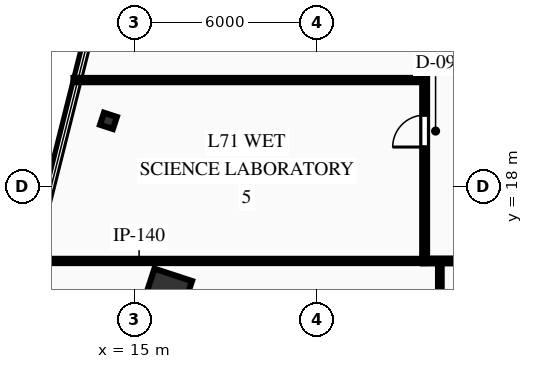
"""IFC4 building model, lengths in metres.
Left out: names, types, materials, properties, quantities, classifications, styles, units other than length and angle.
Written with IfcOpenShell. Run it as: python <this file> out.ifc"""

import sys

from ifc_helpers import new_model, si_unit, direction, frame, frame_2d, origin, origin_2d, place, context, subcontext, project, spatial, rectangle, hollow_rectangle, i_section, extrude, element, fill, save


model = new_model("IFC4")
c1 = context("Model", 3, precision=1e-05, world=origin(), true_north=direction((0.0, 1.0)))
c2 = subcontext(c1, "Body", "Model", "MODEL_VIEW")
j1 = project(units=[si_unit("LENGTHUNIT", "METRE"), si_unit("PLANEANGLEUNIT", "RADIAN")], contexts=[c1])
p1 = place(None, origin())
s1 = spatial("IfcSite", under=j1, at=p1, CompositionType="ELEMENT")
p2 = place(p1, origin())
s2 = spatial("IfcBuilding", under=s1, at=p2, CompositionType="ELEMENT")
p3 = place(p2, frame((0.0, 0.0, 282.45)))
s3 = spatial("IfcBuildingStorey", under=s2, at=p3, CompositionType="ELEMENT", Elevation=282.45)
p4 = place(p3, frame((16.077, 14.475, 0.0), z_axis=(0.0, 0.0, 1.0), x_axis=(0.311008203279, 0.950407227189, 0.0)))
e1 = element("IfcColumn", 1, at=p4, inside=s3, PredefinedType="COLUMN", context=c2, shape_type="SweptSolid", body=[
    extrude(hollow_rectangle(XDim=1.3, YDim=1.3, WallThickness=0.06, at=origin_2d()), origin(), (0.0, 0.0, 1.0), 3.75),
])
p5 = place(p3, frame((14.149, 20.158, 0.0), z_axis=(0.0, 0.0, 1.0), x_axis=(0.311008203279, 0.950407227189, 0.0)))
e2 = element("IfcColumn", 2, at=p5, inside=s3, PredefinedType="COLUMN", context=c2, shape_type="SweptSolid", body=[
    extrude(i_section(OverallWidth=0.416, OverallDepth=0.445, WebThickness=0.039, FlangeThickness=0.063, at=origin_2d()), origin(), (0.0, 0.0, 1.0), 3.75),
])
p6 = place(p3, frame((24.5, 15.55, 0.0), z_axis=(0.0, 0.0, 1.0), x_axis=(1.0, 0.0, 0.0)))
e3 = element("IfcWall", 3, at=p6, inside=s3, PredefinedType="PARTITIONING", context=c2, shape_type="SweptSolid", body=[
    extrude(rectangle(XDim=10.25, YDim=0.16, at=frame_2d((5.125, 0.0))), origin(), (0.0, 0.0, 1.0), 3.48),
])
p7 = place(p6, frame((1.25, 0.0, 0.0)))
e4 = element("IfcOpeningElement", 4, at=p7, cuts=e3, PredefinedType="OPENING", context=c2, shape_type="SweptSolid", body=[
    extrude(rectangle(XDim=0.9, YDim=2.15, at=frame_2d((0.45, 1.075))), frame((0.0, 0.09, 0.0), z_axis=(0.0, -1.0, 0.0), x_axis=(1.0, 0.0, 0.0)), (0.0, 0.0, 1.0), 0.18),
])
p8 = place(p6, frame((3.55, 0.0, 0.0)))
e5 = element("IfcOpeningElement", 5, at=p8, cuts=e3, PredefinedType="OPENING", context=c2, shape_type="SweptSolid", body=[
    extrude(rectangle(XDim=0.9, YDim=2.15, at=frame_2d((0.45, 1.075))), frame((0.0, 0.09, 0.0), z_axis=(0.0, -1.0, 0.0), x_axis=(1.0, 0.0, 0.0)), (0.0, 0.0, 1.0), 0.18),
])
p9 = place(p6, frame((5.8, 0.0, 0.0)))
e6 = element("IfcOpeningElement", 6, at=p9, cuts=e3, PredefinedType="OPENING", context=c2, shape_type="SweptSolid", body=[
    extrude(rectangle(XDim=1.0, YDim=2.15, at=frame_2d((0.5, 1.075))), frame((0.0, 0.09, 0.0), z_axis=(0.0, -1.0, 0.0), x_axis=(1.0, 0.0, 0.0)), (0.0, 0.0, 1.0), 0.18),
])
p10 = place(p3, frame((24.55, 15.55, 0.0), z_axis=(0.0, 0.0, 1.0), x_axis=(0.0, 1.0, 0.0)))
e7 = element("IfcWall", 7, at=p10, inside=s3, PredefinedType="PARTITIONING", context=c2, shape_type="SweptSolid", body=[
    extrude(rectangle(XDim=9.2, YDim=0.16, at=frame_2d((4.6, 0.0))), origin(), (0.0, 0.0, 1.0), 3.48),
])
p11 = place(p10, frame((3.747, 0.0, 0.0)))
e8 = element("IfcOpeningElement", 8, at=p11, cuts=e7, PredefinedType="OPENING", context=c2, shape_type="SweptSolid", body=[
    extrude(rectangle(XDim=1.05, YDim=2.15, at=frame_2d((0.525, 1.075))), frame((0.0, 0.09, 0.0), z_axis=(0.0, -1.0, 0.0), x_axis=(1.0, 0.0, 0.0)), (0.0, 0.0, 1.0), 0.18),
])
p12 = place(p3, frame((25.05, 11.65, 0.0), z_axis=(0.0, 0.0, 1.0), x_axis=(0.0, 1.0, 0.0)))
e9 = element("IfcWall", 9, at=p12, inside=s3, PredefinedType="PARTITIONING", context=c2, shape_type="SweptSolid", body=[
    extrude(rectangle(XDim=3.9, YDim=0.12, at=frame_2d((1.95, 0.0))), origin(), (0.0, 0.0, 1.0), 3.48),
])
p13 = place(p3, frame((11.506, 15.55, 0.0), z_axis=(0.0, 0.0, 1.0), x_axis=(1.0, 0.0, 0.0)))
e10 = element("IfcWall", 10, at=p13, inside=s3, PredefinedType="PARTITIONING", context=c2, shape_type="SweptSolid", body=[
    extrude(rectangle(XDim=13.044, YDim=0.14, at=frame_2d((6.522, 0.0))), origin(), (0.0, 0.0, 1.0), 2.858),
])
p14 = place(p3, frame((13.001, 21.5, 0.0), z_axis=(0.0, 0.0, 1.0), x_axis=(1.0, 0.0, 0.0)))
e11 = element("IfcWall", 11, at=p14, inside=s3, PredefinedType="PARTITIONING", context=c2, shape_type="SweptSolid", body=[
    extrude(rectangle(XDim=11.549, YDim=0.14, at=frame_2d((5.775, 0.0))), origin(), (0.0, 0.0, 1.0), 3.48),
])
p15 = place(p11, origin())
e12 = element("IfcDoor", 12, at=p15, inside=s3, OperationType="SINGLE_SWING_LEFT", PredefinedType="DOOR", context=c2, shape_type="SweptSolid", body=[
    extrude(rectangle(XDim=1.05, YDim=2.15, at=frame_2d((0.525, 1.075))), frame((0.0, 0.025, 0.0), z_axis=(0.0, -1.0, 0.0), x_axis=(1.0, 0.0, 0.0)), (0.0, 0.0, 1.0), 0.05),
])
fill(e8, e12)
save(model, sys.argv[1])
